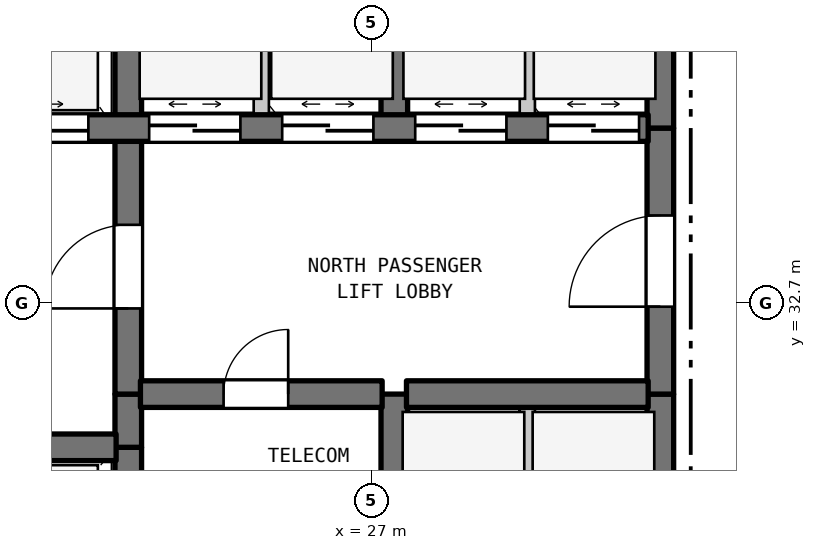
"""IFC4 building model, lengths in metres.
Left out: names, types, materials, properties, quantities, classifications, styles, units other than length and angle.
Written with IfcOpenShell. Run it as: python <this file> out.ifc"""

import sys

from ifc_helpers import new_model, si_unit, direction, frame, frame_2d, origin, place, context, subcontext, project, spatial, rectangle, extrude, element, fill, save


model = new_model("IFC4")
c1 = context("Model", 3, precision=1e-05, world=origin(), true_north=direction((0.0, 1.0)))
c2 = subcontext(c1, "Body", "Model", "MODEL_VIEW")
j1 = project(units=[si_unit("LENGTHUNIT", "METRE"), si_unit("PLANEANGLEUNIT", "RADIAN")], contexts=[c1])
p1 = place(None, origin())
s1 = spatial("IfcSite", under=j1, at=p1, CompositionType="ELEMENT")
p2 = place(p1, origin())
s2 = spatial("IfcBuilding", under=s1, at=p2, CompositionType="ELEMENT")
p3 = place(p2, frame((0.0, 0.0, 13.0)))
s3 = spatial("IfcBuildingStorey", under=s2, at=p3, CompositionType="ELEMENT", Elevation=13.0)
p4 = place(p3, frame((23.8, 29.5, 0.0), z_axis=(0.0, 0.0, 1.0), x_axis=(0.0, 1.0, 0.0)))
e1 = element("IfcWall", 1, at=p4, inside=s3, PredefinedType="SHEAR", context=c2, shape_type="SweptSolid", body=[
    extrude(rectangle(XDim=1.3, YDim=0.35, at=frame_2d((0.65, 0.0))), origin(), (0.0, 0.0, 1.0), 5.58),
])
p5 = place(p3, frame((23.8, 30.8, 0.0), z_axis=(0.0, 0.0, 1.0), x_axis=(0.0, 1.0, 0.0)))
e2 = element("IfcWall", 2, at=p5, inside=s3, PredefinedType="SHEAR", context=c2, shape_type="SweptSolid", body=[
    extrude(rectangle(XDim=0.7, YDim=0.35, at=frame_2d((0.35, 0.0))), origin(), (0.0, 0.0, 1.0), 5.58),
])
p6 = place(p3, frame((23.8, 31.5, 0.0), z_axis=(0.0, 0.0, 1.0), x_axis=(0.0, 1.0, 0.0)))
e3 = element("IfcWall", 3, at=p6, inside=s3, PredefinedType="SHEAR", context=c2, shape_type="SweptSolid", body=[
    extrude(rectangle(XDim=3.5, YDim=0.35, at=frame_2d((1.75, 0.0))), origin(), (0.0, 0.0, 1.0), 5.58),
])
p7 = place(p6, frame((1.127, 0.0, 0.0)))
e4 = element("IfcOpeningElement", 4, at=p7, cuts=e3, PredefinedType="OPENING", context=c2, shape_type="SweptSolid", body=[
    extrude(rectangle(XDim=1.1, YDim=2.15, at=frame_2d((0.55, 1.075))), frame((0.0, 0.185, 0.0), z_axis=(0.0, -1.0, 0.0), x_axis=(1.0, 0.0, 0.0)), (0.0, 0.0, 1.0), 0.37),
])
p8 = place(p3, frame((23.8, 35.0, 0.0), z_axis=(0.0, 0.0, 1.0), x_axis=(0.0, 1.0, 0.0)))
e5 = element("IfcWall", 5, at=p8, inside=s3, PredefinedType="SHEAR", context=c2, shape_type="SweptSolid", body=[
    extrude(rectangle(XDim=2.9, YDim=0.35, at=frame_2d((1.45, 0.0))), origin(), (0.0, 0.0, 1.0), 5.58),
])
p9 = place(p3, frame((25.55, 35.0, 0.0), z_axis=(0.0, 0.0, 1.0), x_axis=(0.0, 1.0, 0.0)))
e6 = element("IfcWall", 6, at=p9, inside=s3, PredefinedType="STANDARD", context=c2, shape_type="SweptSolid", body=[
    extrude(rectangle(XDim=2.9, YDim=0.2, at=frame_2d((1.45, 0.0))), origin(), (0.0, 0.0, 1.0), 5.58),
])
p10 = place(p3, frame((27.3, 29.5, 0.0), z_axis=(0.0, 0.0, 1.0), x_axis=(0.0, 1.0, 0.0)))
e7 = element("IfcWall", 7, at=p10, inside=s3, PredefinedType="SHEAR", context=c2, shape_type="SweptSolid", body=[
    extrude(rectangle(XDim=2.0, YDim=0.35, at=frame_2d((1.0, 0.0))), origin(), (0.0, 0.0, 1.0), 5.58),
])
p11 = place(p3, frame((27.3, 35.0, 0.0), z_axis=(0.0, 0.0, 1.0), x_axis=(0.0, 1.0, 0.0)))
e8 = element("IfcWall", 8, at=p11, inside=s3, PredefinedType="SHEAR", context=c2, shape_type="SweptSolid", body=[
    extrude(rectangle(XDim=2.9, YDim=0.35, at=frame_2d((1.45, 0.0))), origin(), (0.0, 0.0, 1.0), 5.58),
])
p12 = place(p3, frame((29.05, 28.9, 0.0), z_axis=(0.0, 0.0, 1.0), x_axis=(0.0, 1.0, 0.0)))
e9 = element("IfcWall", 9, at=p12, inside=s3, PredefinedType="STANDARD", context=c2, shape_type="SweptSolid", body=[
    extrude(rectangle(XDim=2.6, YDim=0.2, at=frame_2d((1.3, 0.0))), origin(), (0.0, 0.0, 1.0), 5.58),
])
p13 = place(p3, frame((29.05, 35.0, 0.0), z_axis=(0.0, 0.0, 1.0), x_axis=(0.0, 1.0, 0.0)))
e10 = element("IfcWall", 10, at=p13, inside=s3, PredefinedType="STANDARD", context=c2, shape_type="SweptSolid", body=[
    extrude(rectangle(XDim=2.9, YDim=0.2, at=frame_2d((1.45, 0.0))), origin(), (0.0, 0.0, 1.0), 5.58),
])
p14 = place(p3, frame((30.8, 28.9, 0.0), z_axis=(0.0, 0.0, 1.0), x_axis=(0.0, 1.0, 0.0)))
e11 = element("IfcWall", 11, at=p14, inside=s3, PredefinedType="SHEAR", context=c2, shape_type="SweptSolid", body=[
    extrude(rectangle(XDim=2.6, YDim=0.35, at=frame_2d((1.3, 0.0))), origin(), (0.0, 0.0, 1.0), 5.58),
])
p15 = place(p3, frame((30.8, 31.5, 0.0), z_axis=(0.0, 0.0, 1.0), x_axis=(0.0, 1.0, 0.0)))
e12 = element("IfcWall", 12, at=p15, inside=s3, PredefinedType="SHEAR", context=c2, shape_type="SweptSolid", body=[
    extrude(rectangle(XDim=3.5, YDim=0.35, at=frame_2d((1.75, 0.0))), origin(), (0.0, 0.0, 1.0), 5.58),
])
p16 = place(p15, frame((1.15, 0.0, 0.0)))
e13 = element("IfcOpeningElement", 13, at=p16, cuts=e12, PredefinedType="OPENING", context=c2, shape_type="SweptSolid", body=[
    extrude(rectangle(XDim=1.2, YDim=2.2, at=frame_2d((0.6, 1.1))), frame((0.0, 0.185, 0.0), z_axis=(0.0, -1.0, 0.0), x_axis=(1.0, 0.0, 0.0)), (0.0, 0.0, 1.0), 0.37),
])
p17 = place(p3, frame((30.8, 35.0, 0.0), z_axis=(0.0, 0.0, 1.0), x_axis=(0.0, 1.0, 0.0)))
e14 = element("IfcWall", 14, at=p17, inside=s3, PredefinedType="SHEAR", context=c2, shape_type="SweptSolid", body=[
    extrude(rectangle(XDim=2.9, YDim=0.35, at=frame_2d((1.45, 0.0))), origin(), (0.0, 0.0, 1.0), 5.58),
])
p18 = place(p3, frame((19.16, 30.8, 0.0), z_axis=(0.0, 0.0, 1.0), x_axis=(1.0, 0.0, 0.0)))
e15 = element("IfcWall", 15, at=p18, inside=s3, PredefinedType="SHEAR", context=c2, shape_type="SweptSolid", body=[
    extrude(rectangle(XDim=4.48, YDim=0.35, at=frame_2d((2.24, 0.0))), origin(), (0.0, 0.0, 1.0), 5.58),
])
p19 = place(p3, frame((23.96, 31.5, 0.0), z_axis=(0.0, 0.0, 1.0), x_axis=(1.0, 0.0, 0.0)))
e16 = element("IfcWall", 16, at=p19, inside=s3, PredefinedType="SHEAR", context=c2, shape_type="SweptSolid", body=[
    extrude(rectangle(XDim=3.18, YDim=0.35, at=frame_2d((1.59, 0.0))), origin(), (0.0, 0.0, 1.0), 5.58),
])
p20 = place(p19, frame((1.094, 0.0, 0.0)))
e17 = element("IfcOpeningElement", 17, at=p20, cuts=e16, PredefinedType="OPENING", context=c2, shape_type="SweptSolid", body=[
    extrude(rectangle(XDim=0.85, YDim=2.1, at=frame_2d((0.425, 1.05))), frame((0.0, 0.185, 0.0), z_axis=(0.0, -1.0, 0.0), x_axis=(1.0, 0.0, 0.0)), (0.0, 0.0, 1.0), 0.37),
])
p21 = place(p3, frame((27.46, 31.5, 0.0), z_axis=(0.0, 0.0, 1.0), x_axis=(1.0, 0.0, 0.0)))
e18 = element("IfcWall", 18, at=p21, inside=s3, PredefinedType="SHEAR", context=c2, shape_type="SweptSolid", body=[
    extrude(rectangle(XDim=3.18, YDim=0.35, at=frame_2d((1.59, 0.0))), origin(), (0.0, 0.0, 1.0), 5.58),
])
p22 = place(p3, frame((19.16, 35.0, 0.0), z_axis=(0.0, 0.0, 1.0), x_axis=(1.0, 0.0, 0.0)))
e19 = element("IfcWall", 19, at=p22, inside=s3, PredefinedType="SHEAR", context=c2, shape_type="SweptSolid", body=[
    extrude(rectangle(XDim=11.48, YDim=0.35, at=frame_2d((5.74, 0.0))), origin(), (0.0, 0.0, 1.0), 5.58),
])
p23 = place(p22, frame((0.365, 0.0, 0.0)))
e20 = element("IfcOpeningElement", 20, at=p23, cuts=e19, PredefinedType="OPENING", context=c2, shape_type="SweptSolid", body=[
    extrude(rectangle(XDim=1.35, YDim=2.2, at=frame_2d((0.675, 1.1))), frame((0.0, 0.185, 0.0), z_axis=(0.0, -1.0, 0.0), x_axis=(1.0, 0.0, 0.0)), (0.0, 0.0, 1.0), 0.37),
])
p24 = place(p22, frame((2.765, 0.0, 0.0)))
e21 = element("IfcOpeningElement", 21, at=p24, cuts=e19, PredefinedType="OPENING", context=c2, shape_type="SweptSolid", body=[
    extrude(rectangle(XDim=1.35, YDim=2.2, at=frame_2d((0.675, 1.1))), frame((0.0, 0.185, 0.0), z_axis=(0.0, -1.0, 0.0), x_axis=(1.0, 0.0, 0.0)), (0.0, 0.0, 1.0), 0.37),
])
p25 = place(p22, frame((4.915, 0.0, 0.0)))
e22 = element("IfcOpeningElement", 22, at=p25, cuts=e19, PredefinedType="OPENING", context=c2, shape_type="SweptSolid", body=[
    extrude(rectangle(XDim=1.2, YDim=2.2, at=frame_2d((0.6, 1.1))), frame((0.0, 0.185, 0.0), z_axis=(0.0, -1.0, 0.0), x_axis=(1.0, 0.0, 0.0)), (0.0, 0.0, 1.0), 0.37),
])
p26 = place(p22, frame((6.665, 0.0, 0.0)))
e23 = element("IfcOpeningElement", 23, at=p26, cuts=e19, PredefinedType="OPENING", context=c2, shape_type="SweptSolid", body=[
    extrude(rectangle(XDim=1.2, YDim=2.2, at=frame_2d((0.6, 1.1))), frame((0.0, 0.185, 0.0), z_axis=(0.0, -1.0, 0.0), x_axis=(1.0, 0.0, 0.0)), (0.0, 0.0, 1.0), 0.37),
])
p27 = place(p22, frame((8.415, 0.0, 0.0)))
e24 = element("IfcOpeningElement", 24, at=p27, cuts=e19, PredefinedType="OPENING", context=c2, shape_type="SweptSolid", body=[
    extrude(rectangle(XDim=1.2, YDim=2.2, at=frame_2d((0.6, 1.1))), frame((0.0, 0.185, 0.0), z_axis=(0.0, -1.0, 0.0), x_axis=(1.0, 0.0, 0.0)), (0.0, 0.0, 1.0), 0.37),
])
p28 = place(p22, frame((10.16, 0.0, 0.0)))
e25 = element("IfcOpeningElement", 25, at=p28, cuts=e19, PredefinedType="OPENING", context=c2, shape_type="SweptSolid", body=[
    extrude(rectangle(XDim=1.2, YDim=2.2, at=frame_2d((0.6, 1.1))), frame((0.0, 0.185, 0.0), z_axis=(0.0, -1.0, 0.0), x_axis=(1.0, 0.0, 0.0)), (0.0, 0.0, 1.0), 0.37),
])
p29 = place(p7, origin())
e26 = element("IfcDoor", 26, at=p29, inside=s3, OperationType="SINGLE_SWING_LEFT", PredefinedType="DOOR", context=c2, shape_type="SweptSolid", body=[
    extrude(rectangle(XDim=1.1, YDim=2.15, at=frame_2d((0.55, 1.075))), frame((0.0, 0.025, 0.0), z_axis=(0.0, -1.0, 0.0), x_axis=(1.0, 0.0, 0.0)), (0.0, 0.0, 1.0), 0.05),
])
fill(e4, e26)
p30 = place(p16, origin())
e27 = element("IfcDoor", 27, at=p30, inside=s3, OperationType="SINGLE_SWING_LEFT", PredefinedType="DOOR", context=c2, shape_type="SweptSolid", body=[
    extrude(rectangle(XDim=1.2, YDim=2.2, at=frame_2d((0.6, 1.1))), frame((0.0, 0.025, 0.0), z_axis=(0.0, -1.0, 0.0), x_axis=(1.0, 0.0, 0.0)), (0.0, 0.0, 1.0), 0.05),
])
fill(e13, e27)
p31 = place(p20, origin())
e28 = element("IfcDoor", 28, at=p31, inside=s3, OperationType="SINGLE_SWING_RIGHT", PredefinedType="DOOR", context=c2, shape_type="SweptSolid", body=[
    extrude(rectangle(XDim=0.85, YDim=2.1, at=frame_2d((0.425, 1.05))), frame((0.0, 0.025, 0.0), z_axis=(0.0, -1.0, 0.0), x_axis=(1.0, 0.0, 0.0)), (0.0, 0.0, 1.0), 0.05),
])
fill(e17, e28)
p32 = place(p24, origin())
e29 = element("IfcDoor", 29, at=p32, inside=s3, OperationType="DOUBLE_DOOR_SLIDING", PredefinedType="DOOR", context=c2, shape_type="SweptSolid", body=[
    extrude(rectangle(XDim=1.35, YDim=2.2, at=frame_2d((0.675, 1.1))), frame((0.0, 0.025, 0.0), z_axis=(0.0, -1.0, 0.0), x_axis=(1.0, 0.0, 0.0)), (0.0, 0.0, 1.0), 0.05),
])
fill(e21, e29)
p33 = place(p25, origin())
e30 = element("IfcDoor", 30, at=p33, inside=s3, OperationType="DOUBLE_DOOR_SLIDING", PredefinedType="DOOR", context=c2, shape_type="SweptSolid", body=[
    extrude(rectangle(XDim=1.2, YDim=2.2, at=frame_2d((0.6, 1.1))), frame((0.0, 0.025, 0.0), z_axis=(0.0, -1.0, 0.0), x_axis=(1.0, 0.0, 0.0)), (0.0, 0.0, 1.0), 0.05),
])
fill(e22, e30)
p34 = place(p26, origin())
e31 = element("IfcDoor", 31, at=p34, inside=s3, OperationType="DOUBLE_DOOR_SLIDING", PredefinedType="DOOR", context=c2, shape_type="SweptSolid", body=[
    extrude(rectangle(XDim=1.2, YDim=2.2, at=frame_2d((0.6, 1.1))), frame((0.0, 0.025, 0.0), z_axis=(0.0, -1.0, 0.0), x_axis=(1.0, 0.0, 0.0)), (0.0, 0.0, 1.0), 0.05),
])
fill(e23, e31)
p35 = place(p27, origin())
e32 = element("IfcDoor", 32, at=p35, inside=s3, OperationType="DOUBLE_DOOR_SLIDING", PredefinedType="DOOR", context=c2, shape_type="SweptSolid", body=[
    extrude(rectangle(XDim=1.2, YDim=2.2, at=frame_2d((0.6, 1.1))), frame((0.0, 0.025, 0.0), z_axis=(0.0, -1.0, 0.0), x_axis=(1.0, 0.0, 0.0)), (0.0, 0.0, 1.0), 0.05),
])
fill(e24, e32)
p36 = place(p28, origin())
e33 = element("IfcDoor", 33, at=p36, inside=s3, OperationType="DOUBLE_DOOR_SLIDING", PredefinedType="DOOR", context=c2, shape_type="SweptSolid", body=[
    extrude(rectangle(XDim=1.2, YDim=2.2, at=frame_2d((0.6, 1.1))), frame((0.0, 0.025, 0.0), z_axis=(0.0, -1.0, 0.0), x_axis=(1.0, 0.0, 0.0)), (0.0, 0.0, 1.0), 0.05),
])
fill(e25, e33)
save(model, sys.argv[1])
